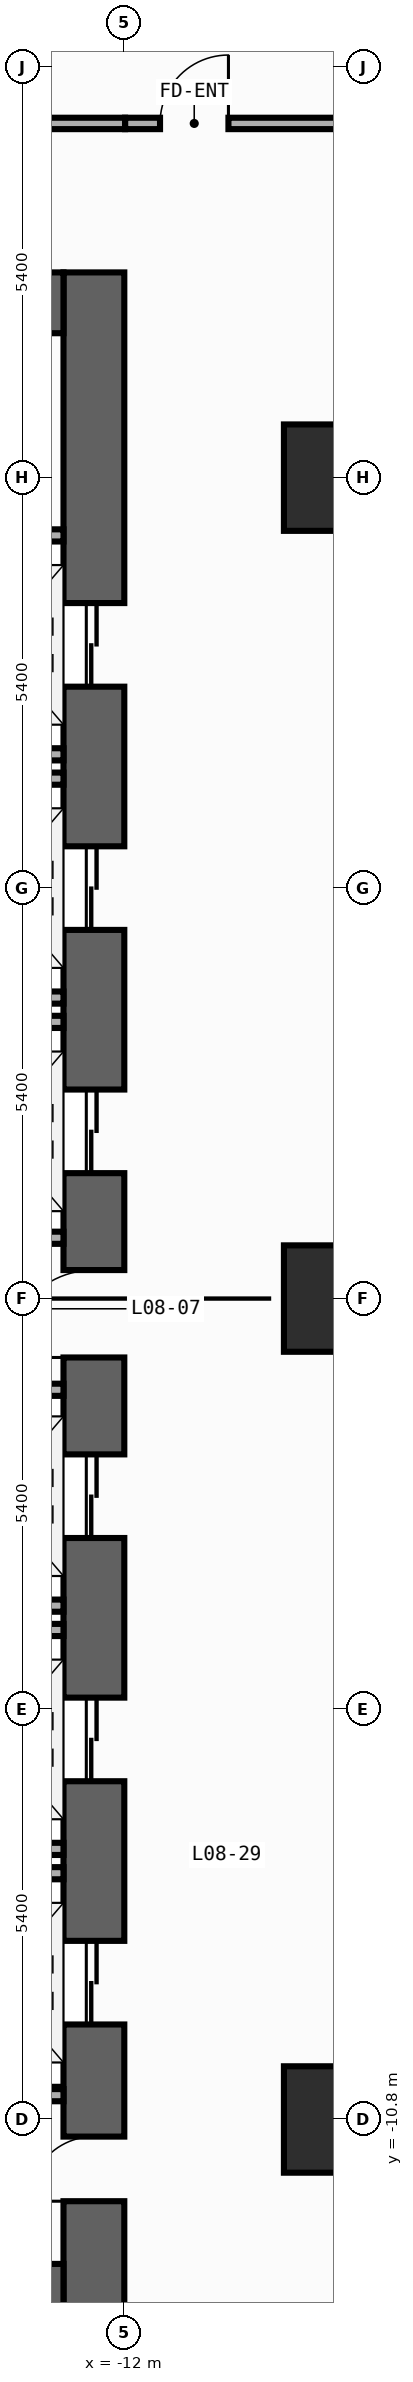
"""IFC4 building model, lengths in metres.
Left out: names, types, materials, properties, quantities, classifications, styles, units other than length and angle.
Written with IfcOpenShell. Run it as: python <this file> out.ifc"""

import sys

from ifc_helpers import new_model, si_unit, direction, frame, frame_2d, origin, origin_2d, place, context, subcontext, project, spatial, rectangle, extrude, element, fill, save


model = new_model("IFC4")
c1 = context("Model", 3, precision=1e-05, world=origin(), true_north=direction((0.0, 1.0)))
c2 = subcontext(c1, "Body", "Model", "MODEL_VIEW")
j1 = project(units=[si_unit("LENGTHUNIT", "METRE"), si_unit("PLANEANGLEUNIT", "RADIAN")], contexts=[c1])
p1 = place(None, origin())
s1 = spatial("IfcSite", under=j1, at=p1, CompositionType="ELEMENT")
p2 = place(p1, origin())
s2 = spatial("IfcBuilding", under=s1, at=p2, CompositionType="ELEMENT")
p3 = place(p2, frame((0.0, 0.0, 34.4)))
s3 = spatial("IfcBuildingStorey", under=s2, at=p3, CompositionType="ELEMENT", Elevation=34.4)
p4 = place(p3, frame((-12.4, -13.5, 0.0), z_axis=(0.0, 0.0, 1.0), x_axis=(0.0, 1.0, 0.0)))
e1 = element("IfcWall", 1, at=p4, inside=s3, PredefinedType="SHEAR", context=c2, shape_type="SweptSolid", body=[
    extrude(rectangle(XDim=27.0, YDim=0.8, at=frame_2d((13.5, 0.0))), origin(), (0.0, 0.0, 1.0), 3.94),
])
p5 = place(p4, frame((21.55, 0.0, 0.0)))
e2 = element("IfcOpeningElement", 2, at=p5, cuts=e1, PredefinedType="OPENING", context=c2, shape_type="SweptSolid", body=[
    extrude(rectangle(XDim=1.1, YDim=2.2, at=frame_2d((0.55, 1.1))), frame((0.0, 0.41, 0.0), z_axis=(0.0, -1.0, 0.0), x_axis=(1.0, 0.0, 0.0)), (0.0, 0.0, 1.0), 0.82),
])
p6 = place(p4, frame((18.35, 0.0, 0.0)))
e3 = element("IfcOpeningElement", 3, at=p6, cuts=e1, PredefinedType="OPENING", context=c2, shape_type="SweptSolid", body=[
    extrude(rectangle(XDim=1.1, YDim=2.2, at=frame_2d((0.55, 1.1))), frame((0.0, 0.41, 0.0), z_axis=(0.0, -1.0, 0.0), x_axis=(1.0, 0.0, 0.0)), (0.0, 0.0, 1.0), 0.82),
])
p7 = place(p4, frame((15.15, 0.0, 0.0)))
e4 = element("IfcOpeningElement", 4, at=p7, cuts=e1, PredefinedType="OPENING", context=c2, shape_type="SweptSolid", body=[
    extrude(rectangle(XDim=1.1, YDim=2.2, at=frame_2d((0.55, 1.1))), frame((0.0, 0.41, 0.0), z_axis=(0.0, -1.0, 0.0), x_axis=(1.0, 0.0, 0.0)), (0.0, 0.0, 1.0), 0.82),
])
p8 = place(p4, frame((10.35, 0.0, 0.0)))
e5 = element("IfcOpeningElement", 5, at=p8, cuts=e1, PredefinedType="OPENING", context=c2, shape_type="SweptSolid", body=[
    extrude(rectangle(XDim=1.1, YDim=2.2, at=frame_2d((0.55, 1.1))), frame((0.0, 0.41, 0.0), z_axis=(0.0, -1.0, 0.0), x_axis=(1.0, 0.0, 0.0)), (0.0, 0.0, 1.0), 0.82),
])
p9 = place(p4, frame((7.15, 0.0, 0.0)))
e6 = element("IfcOpeningElement", 6, at=p9, cuts=e1, PredefinedType="OPENING", context=c2, shape_type="SweptSolid", body=[
    extrude(rectangle(XDim=1.1, YDim=2.2, at=frame_2d((0.55, 1.1))), frame((0.0, 0.41, 0.0), z_axis=(0.0, -1.0, 0.0), x_axis=(1.0, 0.0, 0.0)), (0.0, 0.0, 1.0), 0.82),
])
p10 = place(p4, frame((3.95, 0.0, 0.0)))
e7 = element("IfcOpeningElement", 7, at=p10, cuts=e1, PredefinedType="OPENING", context=c2, shape_type="SweptSolid", body=[
    extrude(rectangle(XDim=1.1, YDim=2.2, at=frame_2d((0.55, 1.1))), frame((0.0, 0.41, 0.0), z_axis=(0.0, -1.0, 0.0), x_axis=(1.0, 0.0, 0.0)), (0.0, 0.0, 1.0), 0.82),
])
p11 = place(p4, frame((12.725, 0.0, 0.0)))
e8 = element("IfcOpeningElement", 8, at=p11, cuts=e1, PredefinedType="OPENING", context=c2, shape_type="SweptSolid", body=[
    extrude(rectangle(XDim=1.15, YDim=2.2, at=frame_2d((0.575, 1.1))), frame((0.0, 0.41, 0.0), z_axis=(0.0, -1.0, 0.0), x_axis=(1.0, 0.0, 0.0)), (0.0, 0.0, 1.0), 0.82),
])
p12 = place(p4, frame((1.625, 0.0, 0.0)))
e9 = element("IfcOpeningElement", 9, at=p12, cuts=e1, PredefinedType="OPENING", context=c2, shape_type="SweptSolid", body=[
    extrude(rectangle(XDim=0.85, YDim=2.1, at=frame_2d((0.425, 1.05))), frame((0.0, 0.41, 0.0), z_axis=(0.0, -1.0, 0.0), x_axis=(1.0, 0.0, 0.0)), (0.0, 0.0, 1.0), 0.82),
])
for number, where, z_axis, x_axis in (
    (10, (-19.6, -13.1, 0.0), (0.0, 0.0, 1.0), (1.0, 0.0, 0.0)),
    (11, (-19.6, 13.1, 0.0), (0.0, 0.0, 1.0), (1.0, 0.0, 0.0)),
):
    element("IfcWall", number, at=place(p3, frame(where, z_axis=z_axis, x_axis=x_axis)), inside=s3, PredefinedType="SHEAR", context=c2, shape_type="SweptSolid", body=[
        extrude(rectangle(XDim=6.8, YDim=0.8, at=frame_2d((3.4, 0.0))), origin(), (0.0, 0.0, 1.0), 3.94),
    ])
for number, where, z_axis, x_axis in (
    (12, (-9.2, -10.8, 0.0), (0.0, 0.0, 1.0), (1.0, 0.0, 0.0)),
    (13, (-9.2, 0.0, 0.0), (0.0, 0.0, 1.0), (1.0, 0.0, 0.0)),
    (14, (-9.2, 10.8, 0.0), (0.0, 0.0, 1.0), (1.0, 0.0, 0.0)),
):
    element("IfcColumn", number, at=place(p3, frame(where, z_axis=z_axis, x_axis=x_axis)), inside=s3, PredefinedType="COLUMN", context=c2, shape_type="SweptSolid", body=[
        extrude(rectangle(XDim=1.4, YDim=1.4, at=origin_2d()), origin(), (0.0, 0.0, 1.0), 4.2),
    ])
for number, where, z_axis, x_axis in (
    (15, (-14.99, 7.16, 0.0), (0.0, 0.0, 1.0), (1.0, 0.0, 0.0)),
    (16, (-14.99, 10.04, 0.0), (0.0, 0.0, 1.0), (1.0, 0.0, 0.0)),
    (17, (-14.99, 3.96, 0.0), (0.0, 0.0, 1.0), (1.0, 0.0, 0.0)),
    (18, (-14.99, 6.84, 0.0), (0.0, 0.0, 1.0), (1.0, 0.0, 0.0)),
    (19, (-14.99, 3.64, 0.0), (0.0, 0.0, 1.0), (1.0, 0.0, 0.0)),
    (20, (-14.99, -4.04, 0.0), (0.0, 0.0, 1.0), (1.0, 0.0, 0.0)),
    (21, (-14.99, -7.24, 0.0), (0.0, 0.0, 1.0), (1.0, 0.0, 0.0)),
    (22, (-14.99, -4.36, 0.0), (0.0, 0.0, 1.0), (1.0, 0.0, 0.0)),
    (23, (-14.99, -7.56, 0.0), (0.0, 0.0, 1.0), (1.0, 0.0, 0.0)),
):
    element("IfcWall", number, at=place(p3, frame(where, z_axis=z_axis, x_axis=x_axis)), inside=s3, PredefinedType="STANDARD", context=c2, shape_type="SweptSolid", body=[
        extrude(rectangle(XDim=2.19, YDim=0.16, at=frame_2d((1.095, 0.0))), origin(), (0.0, 0.0, 1.0), 3.94),
    ])
for number, where, z_axis, x_axis in (
    (24, (-15.4, 0.8, 0.0), (0.0, 0.0, 1.0), (1.0, 0.0, 0.0)),
    (25, (-15.4, -1.2, 0.0), (0.0, 0.0, 1.0), (1.0, 0.0, 0.0)),
    (26, (-15.4, -10.48, 0.0), (0.0, 0.0, 1.0), (1.0, 0.0, 0.0)),
):
    element("IfcWall", number, at=place(p3, frame(where, z_axis=z_axis, x_axis=x_axis)), inside=s3, PredefinedType="STANDARD", context=c2, shape_type="SweptSolid", body=[
        extrude(rectangle(XDim=2.6, YDim=0.16, at=frame_2d((1.3, 0.0))), origin(), (0.0, 0.0, 1.0), 3.94),
    ])
p13 = place(p3, frame((-11.99, 15.46, 0.0), z_axis=(0.0, 0.0, 1.0), x_axis=(1.0, 0.0, 0.0)))
e27 = element("IfcWall", 27, at=p13, inside=s3, PredefinedType="PARTITIONING", context=c2, shape_type="SweptSolid", body=[
    extrude(rectangle(XDim=3.35, YDim=0.15, at=frame_2d((1.675, 0.0))), origin(), (0.0, 0.0, 1.0), 3.94),
])
p14 = place(p13, frame((0.46, 0.0, 0.0)))
e28 = element("IfcOpeningElement", 28, at=p14, cuts=e27, PredefinedType="OPENING", context=c2, shape_type="SweptSolid", body=[
    extrude(rectangle(XDim=0.9, YDim=2.15, at=frame_2d((0.45, 1.075))), frame((0.0, 0.085, 0.0), z_axis=(0.0, -1.0, 0.0), x_axis=(1.0, 0.0, 0.0)), (0.0, 0.0, 1.0), 0.17),
])
p15 = place(p3, frame((-20.64, 15.46, 0.0), z_axis=(0.0, 0.0, 1.0), x_axis=(1.0, 0.0, 0.0)))
e29 = element("IfcWall", 29, at=p15, inside=s3, PredefinedType="PARTITIONING", context=c2, shape_type="SweptSolid", body=[
    extrude(rectangle(XDim=8.65, YDim=0.15, at=frame_2d((4.325, 0.0))), origin(), (0.0, 0.0, 1.0), 3.94),
])
p16 = place(p15, frame((2.871, 0.0, 0.0)))
e30 = element("IfcOpeningElement", 30, at=p16, cuts=e29, PredefinedType="OPENING", context=c2, shape_type="SweptSolid", body=[
    extrude(rectangle(XDim=0.9, YDim=2.15, at=frame_2d((0.45, 1.075))), frame((0.0, 0.085, 0.0), z_axis=(0.0, -1.0, 0.0), x_axis=(1.0, 0.0, 0.0)), (0.0, 0.0, 1.0), 0.17),
])
p17 = place(p5, origin())
e31 = element("IfcDoor", 31, at=p17, inside=s3, OperationType="DOUBLE_DOOR_SLIDING", PredefinedType="DOOR", context=c2, shape_type="SweptSolid", body=[
    extrude(rectangle(XDim=1.1, YDim=2.2, at=frame_2d((0.55, 1.1))), frame((0.0, 0.025, 0.0), z_axis=(0.0, -1.0, 0.0), x_axis=(1.0, 0.0, 0.0)), (0.0, 0.0, 1.0), 0.05),
])
fill(e2, e31)
p18 = place(p6, origin())
e32 = element("IfcDoor", 32, at=p18, inside=s3, OperationType="DOUBLE_DOOR_SLIDING", PredefinedType="DOOR", context=c2, shape_type="SweptSolid", body=[
    extrude(rectangle(XDim=1.1, YDim=2.2, at=frame_2d((0.55, 1.1))), frame((0.0, 0.025, 0.0), z_axis=(0.0, -1.0, 0.0), x_axis=(1.0, 0.0, 0.0)), (0.0, 0.0, 1.0), 0.05),
])
fill(e3, e32)
p19 = place(p7, origin())
e33 = element("IfcDoor", 33, at=p19, inside=s3, OperationType="DOUBLE_DOOR_SLIDING", PredefinedType="DOOR", context=c2, shape_type="SweptSolid", body=[
    extrude(rectangle(XDim=1.1, YDim=2.2, at=frame_2d((0.55, 1.1))), frame((0.0, 0.025, 0.0), z_axis=(0.0, -1.0, 0.0), x_axis=(1.0, 0.0, 0.0)), (0.0, 0.0, 1.0), 0.05),
])
fill(e4, e33)
p20 = place(p8, origin())
e34 = element("IfcDoor", 34, at=p20, inside=s3, OperationType="DOUBLE_DOOR_SLIDING", PredefinedType="DOOR", context=c2, shape_type="SweptSolid", body=[
    extrude(rectangle(XDim=1.1, YDim=2.2, at=frame_2d((0.55, 1.1))), frame((0.0, 0.025, 0.0), z_axis=(0.0, -1.0, 0.0), x_axis=(1.0, 0.0, 0.0)), (0.0, 0.0, 1.0), 0.05),
])
fill(e5, e34)
p21 = place(p9, origin())
e35 = element("IfcDoor", 35, at=p21, inside=s3, OperationType="DOUBLE_DOOR_SLIDING", PredefinedType="DOOR", context=c2, shape_type="SweptSolid", body=[
    extrude(rectangle(XDim=1.1, YDim=2.2, at=frame_2d((0.55, 1.1))), frame((0.0, 0.025, 0.0), z_axis=(0.0, -1.0, 0.0), x_axis=(1.0, 0.0, 0.0)), (0.0, 0.0, 1.0), 0.05),
])
fill(e6, e35)
p22 = place(p10, origin())
e36 = element("IfcDoor", 36, at=p22, inside=s3, OperationType="DOUBLE_DOOR_SLIDING", PredefinedType="DOOR", context=c2, shape_type="SweptSolid", body=[
    extrude(rectangle(XDim=1.1, YDim=2.2, at=frame_2d((0.55, 1.1))), frame((0.0, 0.025, 0.0), z_axis=(0.0, -1.0, 0.0), x_axis=(1.0, 0.0, 0.0)), (0.0, 0.0, 1.0), 0.05),
])
fill(e7, e36)
p23 = place(p11, origin())
e37 = element("IfcDoor", 37, at=p23, inside=s3, OperationType="SINGLE_SWING_LEFT", PredefinedType="DOOR", context=c2, shape_type="SweptSolid", body=[
    extrude(rectangle(XDim=1.15, YDim=2.2, at=frame_2d((0.575, 1.1))), frame((0.0, 0.025, 0.0), z_axis=(0.0, -1.0, 0.0), x_axis=(1.0, 0.0, 0.0)), (0.0, 0.0, 1.0), 0.05),
])
fill(e8, e37)
p24 = place(p12, origin())
e38 = element("IfcDoor", 38, at=p24, inside=s3, OperationType="SINGLE_SWING_LEFT", PredefinedType="DOOR", context=c2, shape_type="SweptSolid", body=[
    extrude(rectangle(XDim=0.85, YDim=2.1, at=frame_2d((0.425, 1.05))), frame((0.0, 0.025, 0.0), z_axis=(0.0, -1.0, 0.0), x_axis=(1.0, 0.0, 0.0)), (0.0, 0.0, 1.0), 0.05),
])
fill(e9, e38)
p25 = place(p14, origin())
e39 = element("IfcDoor", 39, at=p25, inside=s3, OperationType="SINGLE_SWING_RIGHT", PredefinedType="DOOR", context=c2, shape_type="SweptSolid", body=[
    extrude(rectangle(XDim=0.9, YDim=2.15, at=frame_2d((0.45, 1.075))), frame((0.0, 0.025, 0.0), z_axis=(0.0, -1.0, 0.0), x_axis=(1.0, 0.0, 0.0)), (0.0, 0.0, 1.0), 0.05),
])
fill(e28, e39)
save(model, sys.argv[1])
